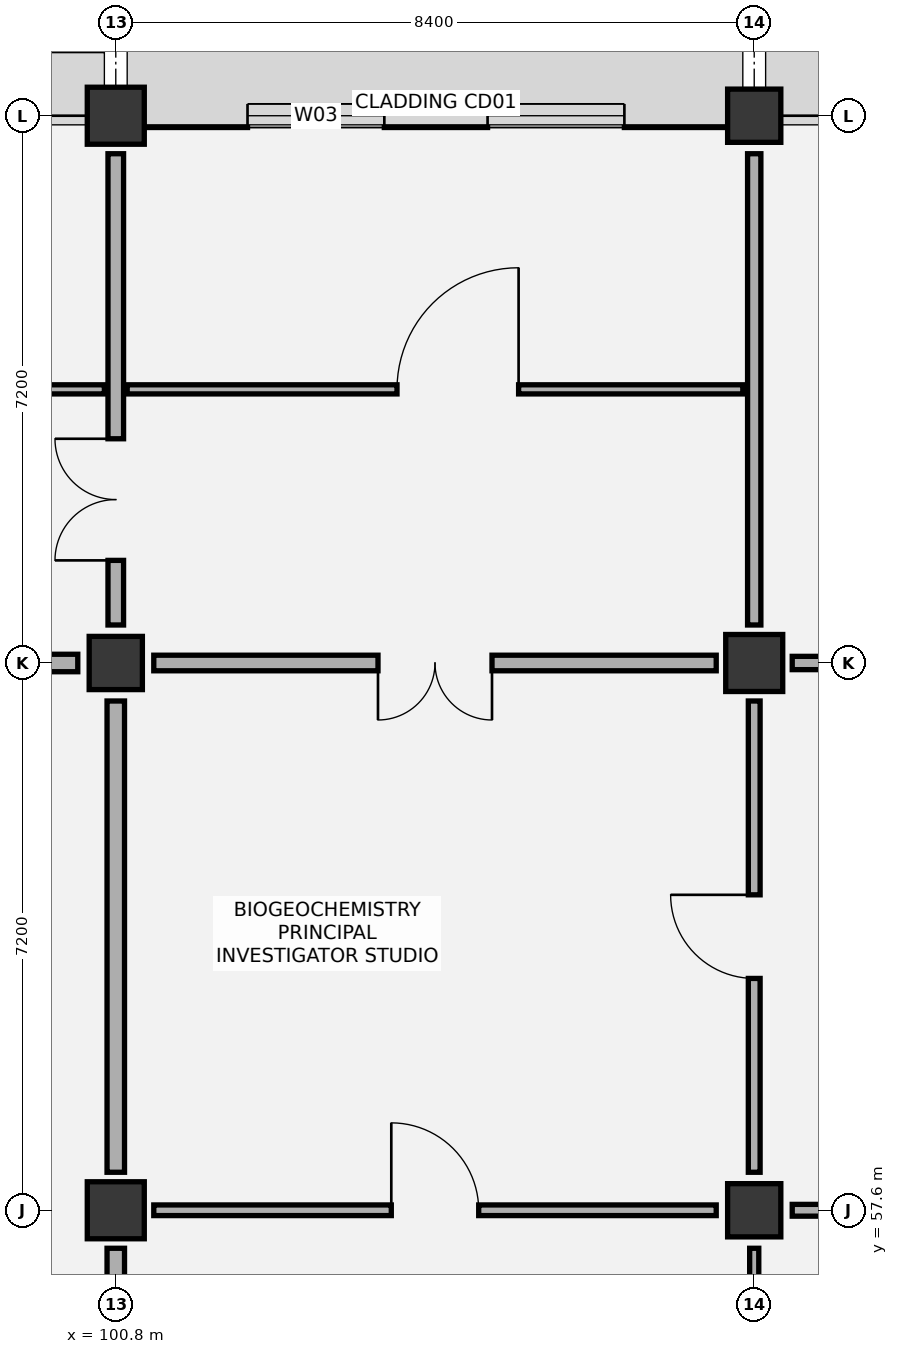
"""IFC4 building model, lengths in metres.
Left out: names, types, materials, properties, quantities, classifications, styles, units other than length and angle.
Written with IfcOpenShell. Run it as: python <this file> out.ifc"""

import sys

from ifc_helpers import new_model, si_unit, direction, frame, frame_2d, origin, origin_2d, place, context, subcontext, project, spatial, rectangle, extrude, element, fill, save


model = new_model("IFC4")
c1 = context("Model", 3, precision=1e-05, world=origin(), true_north=direction((0.0, 1.0)))
c2 = subcontext(c1, "Body", "Model", "MODEL_VIEW")
j1 = project(units=[si_unit("LENGTHUNIT", "METRE"), si_unit("PLANEANGLEUNIT", "RADIAN")], contexts=[c1])
p1 = place(None, origin())
s1 = spatial("IfcSite", under=j1, at=p1, CompositionType="ELEMENT")
p2 = place(p1, origin())
s2 = spatial("IfcBuilding", under=s1, at=p2, CompositionType="ELEMENT")
p3 = place(p2, frame((0.0, 0.0, 35.4)))
s3 = spatial("IfcBuildingStorey", under=s2, at=p3, CompositionType="ELEMENT", Elevation=35.4)
p4 = place(p3, frame((100.8, 57.6, 0.0), z_axis=(0.0, 0.0, 1.0), x_axis=(1.0, 0.0, 0.0)))
e1 = element("IfcColumn", 1, at=p4, inside=s3, PredefinedType="COLUMN", context=c2, shape_type="SweptSolid", body=[
    extrude(rectangle(XDim=0.75, YDim=0.75, at=origin_2d()), origin(), (0.0, 0.0, 1.0), 4.2),
])
p5 = place(p3, frame((100.8, 64.8, 0.0), z_axis=(0.0, 0.0, 1.0), x_axis=(1.0, 0.0, 0.0)))
e2 = element("IfcColumn", 2, at=p5, inside=s3, PredefinedType="COLUMN", context=c2, shape_type="SweptSolid", body=[
    extrude(rectangle(XDim=0.7, YDim=0.7, at=origin_2d()), origin(), (0.0, 0.0, 1.0), 4.2),
])
p6 = place(p3, frame((100.8, 72.0, 0.0), z_axis=(0.0, 0.0, 1.0), x_axis=(1.0, 0.0, 0.0)))
e3 = element("IfcColumn", 3, at=p6, inside=s3, PredefinedType="COLUMN", context=c2, shape_type="SweptSolid", body=[
    extrude(rectangle(XDim=0.75, YDim=0.75, at=origin_2d()), origin(), (0.0, 0.0, 1.0), 4.2),
])
p7 = place(p3, frame((109.2, 57.6, 0.0), z_axis=(0.0, 0.0, 1.0), x_axis=(1.0, 0.0, 0.0)))
e4 = element("IfcColumn", 4, at=p7, inside=s3, PredefinedType="COLUMN", context=c2, shape_type="SweptSolid", body=[
    extrude(rectangle(XDim=0.7, YDim=0.7, at=origin_2d()), origin(), (0.0, 0.0, 1.0), 4.2),
])
p8 = place(p3, frame((109.2, 64.8, 0.0), z_axis=(0.0, 0.0, 1.0), x_axis=(1.0, 0.0, 0.0)))
e5 = element("IfcColumn", 5, at=p8, inside=s3, PredefinedType="COLUMN", context=c2, shape_type="SweptSolid", body=[
    extrude(rectangle(XDim=0.75, YDim=0.75, at=origin_2d()), origin(), (0.0, 0.0, 1.0), 4.2),
])
p9 = place(p3, frame((109.2, 72.0, 0.0), z_axis=(0.0, 0.0, 1.0), x_axis=(1.0, 0.0, 0.0)))
e6 = element("IfcColumn", 6, at=p9, inside=s3, PredefinedType="COLUMN", context=c2, shape_type="SweptSolid", body=[
    extrude(rectangle(XDim=0.7, YDim=0.7, at=origin_2d()), origin(), (0.0, 0.0, 1.0), 4.2),
])
p10 = place(p3, frame((101.175, 72.0, 0.0), z_axis=(0.0, 0.0, 1.0), x_axis=(1.0, 0.0, 0.0)))
e7 = element("IfcWall", 7, at=p10, inside=s3, PredefinedType="SOLIDWALL", context=c2, shape_type="SweptSolid", body=[
    extrude(rectangle(XDim=7.675, YDim=0.31, at=frame_2d((3.837, 0.0))), origin(), (0.0, 0.0, 1.0), 3.365),
])
p11 = place(p10, frame((1.358, 0.0, 0.9)))
e8 = element("IfcOpeningElement", 8, at=p11, cuts=e7, PredefinedType="OPENING", context=c2, shape_type="SweptSolid", body=[
    extrude(rectangle(XDim=1.8, YDim=1.8, at=frame_2d((0.9, 0.9))), frame((0.0, 0.165, 0.0), z_axis=(0.0, -1.0, 0.0), x_axis=(1.0, 0.0, 0.0)), (0.0, 0.0, 1.0), 0.33),
])
p12 = place(p10, frame((4.517, 0.0, 0.9)))
e9 = element("IfcOpeningElement", 9, at=p12, cuts=e7, PredefinedType="OPENING", context=c2, shape_type="SweptSolid", body=[
    extrude(rectangle(XDim=1.8, YDim=1.8, at=frame_2d((0.9, 0.9))), frame((0.0, 0.165, 0.0), z_axis=(0.0, -1.0, 0.0), x_axis=(1.0, 0.0, 0.0)), (0.0, 0.0, 1.0), 0.33),
])
p13 = place(p3, frame((92.55, 68.4, 0.0), z_axis=(0.0, 0.0, 1.0), x_axis=(1.0, 0.0, 0.0)))
e10 = element("IfcWall", 10, at=p13, inside=s3, PredefinedType="PARTITIONING", context=c2, shape_type="SweptSolid", body=[
    extrude(rectangle(XDim=8.1, YDim=0.12, at=frame_2d((4.05, 0.0))), origin(), (0.0, 0.0, 1.0), 3.92),
])
p14 = place(p13, frame((3.55, 0.0, 0.0)))
e11 = element("IfcOpeningElement", 11, at=p14, cuts=e10, PredefinedType="OPENING", context=c2, shape_type="SweptSolid", body=[
    extrude(rectangle(XDim=1.6, YDim=2.2, at=frame_2d((0.8, 1.1))), frame((0.0, 0.07, 0.0), z_axis=(0.0, -1.0, 0.0), x_axis=(1.0, 0.0, 0.0)), (0.0, 0.0, 1.0), 0.14),
])
p15 = place(p3, frame((100.95, 68.4, 0.0), z_axis=(0.0, 0.0, 1.0), x_axis=(1.0, 0.0, 0.0)))
e12 = element("IfcWall", 12, at=p15, inside=s3, PredefinedType="PARTITIONING", context=c2, shape_type="SweptSolid", body=[
    extrude(rectangle(XDim=8.1, YDim=0.12, at=frame_2d((4.05, 0.0))), origin(), (0.0, 0.0, 1.0), 3.92),
])
p16 = place(p15, frame((3.55, 0.0, 0.0)))
e13 = element("IfcOpeningElement", 13, at=p16, cuts=e12, PredefinedType="OPENING", context=c2, shape_type="SweptSolid", body=[
    extrude(rectangle(XDim=1.6, YDim=2.2, at=frame_2d((0.8, 1.1))), frame((0.0, 0.07, 0.0), z_axis=(0.0, -1.0, 0.0), x_axis=(1.0, 0.0, 0.0)), (0.0, 0.0, 1.0), 0.14),
])
p17 = place(p3, frame((100.8, 50.9, 0.0), z_axis=(0.0, 0.0, 1.0), x_axis=(0.0, 1.0, 0.0)))
e14 = element("IfcWall", 14, at=p17, inside=s3, PredefinedType="PARTITIONING", context=c2, shape_type="SweptSolid", body=[
    extrude(rectangle(XDim=6.2, YDim=0.23, at=frame_2d((3.1, 0.0))), origin(), (0.0, 0.0, 1.0), 3.625),
])
p18 = place(p3, frame((100.8, 58.1, 0.0), z_axis=(0.0, 0.0, 1.0), x_axis=(0.0, 1.0, 0.0)))
e15 = element("IfcWall", 15, at=p18, inside=s3, PredefinedType="PARTITIONING", context=c2, shape_type="SweptSolid", body=[
    extrude(rectangle(XDim=6.2, YDim=0.23, at=frame_2d((3.1, 0.0))), origin(), (0.0, 0.0, 1.0), 3.315),
])
p19 = place(p3, frame((92.9, 64.8, 0.0), z_axis=(0.0, 0.0, 1.0), x_axis=(1.0, 0.0, 0.0)))
e16 = element("IfcWall", 16, at=p19, inside=s3, PredefinedType="PARTITIONING", context=c2, shape_type="SweptSolid", body=[
    extrude(rectangle(XDim=7.4, YDim=0.23, at=frame_2d((3.7, 0.0))), origin(), (0.0, 0.0, 1.0), 3.645),
])
p20 = place(p3, frame((100.8, 65.3, 0.0), z_axis=(0.0, 0.0, 1.0), x_axis=(0.0, 1.0, 0.0)))
e17 = element("IfcWall", 17, at=p20, inside=s3, PredefinedType="PARTITIONING", context=c2, shape_type="SweptSolid", body=[
    extrude(rectangle(XDim=6.2, YDim=0.205, at=frame_2d((3.1, 0.0))), origin(), (0.0, 0.0, 1.0), 3.415),
])
p21 = place(p20, frame((0.85, 0.0, 0.0)))
e18 = element("IfcOpeningElement", 18, at=p21, cuts=e17, PredefinedType="OPENING", context=c2, shape_type="SweptSolid", body=[
    extrude(rectangle(XDim=1.6, YDim=2.2, at=frame_2d((0.8, 1.1))), frame((0.0, 0.113, 0.0), z_axis=(0.0, -1.0, 0.0), x_axis=(1.0, 0.0, 0.0)), (0.0, 0.0, 1.0), 0.225),
])
p22 = place(p3, frame((109.2, 50.9, 0.0), z_axis=(0.0, 0.0, 1.0), x_axis=(0.0, 1.0, 0.0)))
e19 = element("IfcWall", 19, at=p22, inside=s3, PredefinedType="PARTITIONING", context=c2, shape_type="SweptSolid", body=[
    extrude(rectangle(XDim=6.2, YDim=0.12, at=frame_2d((3.1, 0.0))), origin(), (0.0, 0.0, 1.0), 3.315),
])
p23 = place(p3, frame((101.3, 57.6, 0.0), z_axis=(0.0, 0.0, 1.0), x_axis=(1.0, 0.0, 0.0)))
e20 = element("IfcWall", 20, at=p23, inside=s3, PredefinedType="PARTITIONING", context=c2, shape_type="SweptSolid", body=[
    extrude(rectangle(XDim=7.4, YDim=0.14, at=frame_2d((3.7, 0.0))), origin(), (0.0, 0.0, 1.0), 3.315),
])
p24 = place(p23, frame((3.125, 0.0, 0.0)))
e21 = element("IfcOpeningElement", 21, at=p24, cuts=e20, PredefinedType="OPENING", context=c2, shape_type="SweptSolid", body=[
    extrude(rectangle(XDim=1.15, YDim=2.1, at=frame_2d((0.575, 1.05))), frame((0.0, 0.08, 0.0), z_axis=(0.0, -1.0, 0.0), x_axis=(1.0, 0.0, 0.0)), (0.0, 0.0, 1.0), 0.16),
])
p25 = place(p3, frame((109.2, 58.1, 0.0), z_axis=(0.0, 0.0, 1.0), x_axis=(0.0, 1.0, 0.0)))
e22 = element("IfcWall", 22, at=p25, inside=s3, PredefinedType="PARTITIONING", context=c2, shape_type="SweptSolid", body=[
    extrude(rectangle(XDim=6.2, YDim=0.155, at=frame_2d((3.1, 0.0))), origin(), (0.0, 0.0, 1.0), 3.415),
])
p26 = place(p25, frame((2.55, 0.0, 0.0)))
e23 = element("IfcOpeningElement", 23, at=p26, cuts=e22, PredefinedType="OPENING", context=c2, shape_type="SweptSolid", body=[
    extrude(rectangle(XDim=1.1, YDim=2.1, at=frame_2d((0.55, 1.05))), frame((0.0, 0.087, 0.0), z_axis=(0.0, -1.0, 0.0), x_axis=(1.0, 0.0, 0.0)), (0.0, 0.0, 1.0), 0.175),
])
p27 = place(p3, frame((101.3, 64.8, 0.0), z_axis=(0.0, 0.0, 1.0), x_axis=(1.0, 0.0, 0.0)))
e24 = element("IfcWall", 24, at=p27, inside=s3, PredefinedType="PARTITIONING", context=c2, shape_type="SweptSolid", body=[
    extrude(rectangle(XDim=7.4, YDim=0.205, at=frame_2d((3.7, 0.0))), origin(), (0.0, 0.0, 1.0), 3.315),
])
p28 = place(p27, frame((2.95, 0.0, 0.0)))
e25 = element("IfcOpeningElement", 25, at=p28, cuts=e24, PredefinedType="OPENING", context=c2, shape_type="SweptSolid", body=[
    extrude(rectangle(XDim=1.5, YDim=2.2, at=frame_2d((0.75, 1.1))), frame((0.0, 0.113, 0.0), z_axis=(0.0, -1.0, 0.0), x_axis=(1.0, 0.0, 0.0)), (0.0, 0.0, 1.0), 0.225),
])
p29 = place(p3, frame((109.2, 65.3, 0.0), z_axis=(0.0, 0.0, 1.0), x_axis=(0.0, 1.0, 0.0)))
e26 = element("IfcWall", 26, at=p29, inside=s3, PredefinedType="PARTITIONING", context=c2, shape_type="SweptSolid", body=[
    extrude(rectangle(XDim=6.2, YDim=0.175, at=frame_2d((3.1, 0.0))), origin(), (0.0, 0.0, 1.0), 3.315),
])
p30 = place(p3, frame((109.7, 57.6, 0.0), z_axis=(0.0, 0.0, 1.0), x_axis=(1.0, 0.0, 0.0)))
e27 = element("IfcWall", 27, at=p30, inside=s3, PredefinedType="PARTITIONING", context=c2, shape_type="SweptSolid", body=[
    extrude(rectangle(XDim=7.4, YDim=0.155, at=frame_2d((3.7, 0.0))), origin(), (0.0, 0.0, 1.0), 3.265),
])
p31 = place(p30, frame((3.15, 0.0, 0.0)))
e28 = element("IfcOpeningElement", 28, at=p31, cuts=e27, PredefinedType="OPENING", context=c2, shape_type="SweptSolid", body=[
    extrude(rectangle(XDim=1.1, YDim=2.1, at=frame_2d((0.55, 1.05))), frame((0.0, 0.087, 0.0), z_axis=(0.0, -1.0, 0.0), x_axis=(1.0, 0.0, 0.0)), (0.0, 0.0, 1.0), 0.175),
])
p32 = place(p3, frame((109.7, 64.8, 0.0), z_axis=(0.0, 0.0, 1.0), x_axis=(1.0, 0.0, 0.0)))
e29 = element("IfcWall", 29, at=p32, inside=s3, PredefinedType="PARTITIONING", context=c2, shape_type="SweptSolid", body=[
    extrude(rectangle(XDim=7.4, YDim=0.175, at=frame_2d((3.7, 0.0))), origin(), (0.0, 0.0, 1.0), 3.265),
])
p33 = place(p32, frame((2.975, 0.0, 0.0)))
e30 = element("IfcOpeningElement", 30, at=p33, cuts=e29, PredefinedType="OPENING", context=c2, shape_type="SweptSolid", body=[
    extrude(rectangle(XDim=1.45, YDim=2.2, at=frame_2d((0.725, 1.1))), frame((0.0, 0.097, 0.0), z_axis=(0.0, -1.0, 0.0), x_axis=(1.0, 0.0, 0.0)), (0.0, 0.0, 1.0), 0.195),
])
p34 = place(p11, origin())
e31 = element("IfcWindow", 31, at=p34, inside=s3, PartitioningType="SINGLE_PANEL", PredefinedType="WINDOW", context=c2, shape_type="SweptSolid", body=[
    extrude(rectangle(XDim=1.8, YDim=1.8, at=frame_2d((0.9, 0.9))), frame((0.0, 0.03, 0.0), z_axis=(0.0, -1.0, 0.0), x_axis=(1.0, 0.0, 0.0)), (0.0, 0.0, 1.0), 0.06),
])
fill(e8, e31)
p35 = place(p12, origin())
e32 = element("IfcWindow", 32, at=p35, inside=s3, PartitioningType="SINGLE_PANEL", PredefinedType="WINDOW", context=c2, shape_type="SweptSolid", body=[
    extrude(rectangle(XDim=1.8, YDim=1.8, at=frame_2d((0.9, 0.9))), frame((0.0, 0.03, 0.0), z_axis=(0.0, -1.0, 0.0), x_axis=(1.0, 0.0, 0.0)), (0.0, 0.0, 1.0), 0.06),
])
fill(e9, e32)
p36 = place(p16, origin())
e33 = element("IfcDoor", 33, at=p36, inside=s3, OperationType="SINGLE_SWING_RIGHT", PredefinedType="DOOR", context=c2, shape_type="SweptSolid", body=[
    extrude(rectangle(XDim=1.6, YDim=2.2, at=frame_2d((0.8, 1.1))), frame((0.0, 0.025, 0.0), z_axis=(0.0, -1.0, 0.0), x_axis=(1.0, 0.0, 0.0)), (0.0, 0.0, 1.0), 0.05),
])
fill(e13, e33)
p37 = place(p21, origin())
e34 = element("IfcDoor", 34, at=p37, inside=s3, OperationType="DOUBLE_DOOR_SINGLE_SWING", PredefinedType="DOOR", context=c2, shape_type="SweptSolid", body=[
    extrude(rectangle(XDim=1.6, YDim=2.2, at=frame_2d((0.8, 1.1))), frame((0.0, 0.025, 0.0), z_axis=(0.0, -1.0, 0.0), x_axis=(1.0, 0.0, 0.0)), (0.0, 0.0, 1.0), 0.05),
])
fill(e18, e34)
p38 = place(p24, origin())
e35 = element("IfcDoor", 35, at=p38, inside=s3, OperationType="SINGLE_SWING_LEFT", PredefinedType="DOOR", context=c2, shape_type="SweptSolid", body=[
    extrude(rectangle(XDim=1.15, YDim=2.1, at=frame_2d((0.575, 1.05))), frame((0.0, 0.025, 0.0), z_axis=(0.0, -1.0, 0.0), x_axis=(1.0, 0.0, 0.0)), (0.0, 0.0, 1.0), 0.05),
])
fill(e21, e35)
p39 = place(p26, origin())
e36 = element("IfcDoor", 36, at=p39, inside=s3, OperationType="SINGLE_SWING_RIGHT", PredefinedType="DOOR", context=c2, shape_type="SweptSolid", body=[
    extrude(rectangle(XDim=1.1, YDim=2.1, at=frame_2d((0.55, 1.05))), frame((0.0, 0.025, 0.0), z_axis=(0.0, -1.0, 0.0), x_axis=(1.0, 0.0, 0.0)), (0.0, 0.0, 1.0), 0.05),
])
fill(e23, e36)
p40 = place(p28, frame((1.5, 0.0, 0.0), z_axis=(0.0, 0.0, 1.0), x_axis=(-1.0, 0.0, 0.0)))
e37 = element("IfcDoor", 37, at=p40, inside=s3, OperationType="DOUBLE_DOOR_SINGLE_SWING", PredefinedType="DOOR", context=c2, shape_type="SweptSolid", body=[
    extrude(rectangle(XDim=1.5, YDim=2.2, at=frame_2d((0.75, 1.1))), frame((0.0, 0.025, 0.0), z_axis=(0.0, -1.0, 0.0), x_axis=(1.0, 0.0, 0.0)), (0.0, 0.0, 1.0), 0.05),
])
fill(e25, e37)
save(model, sys.argv[1])
